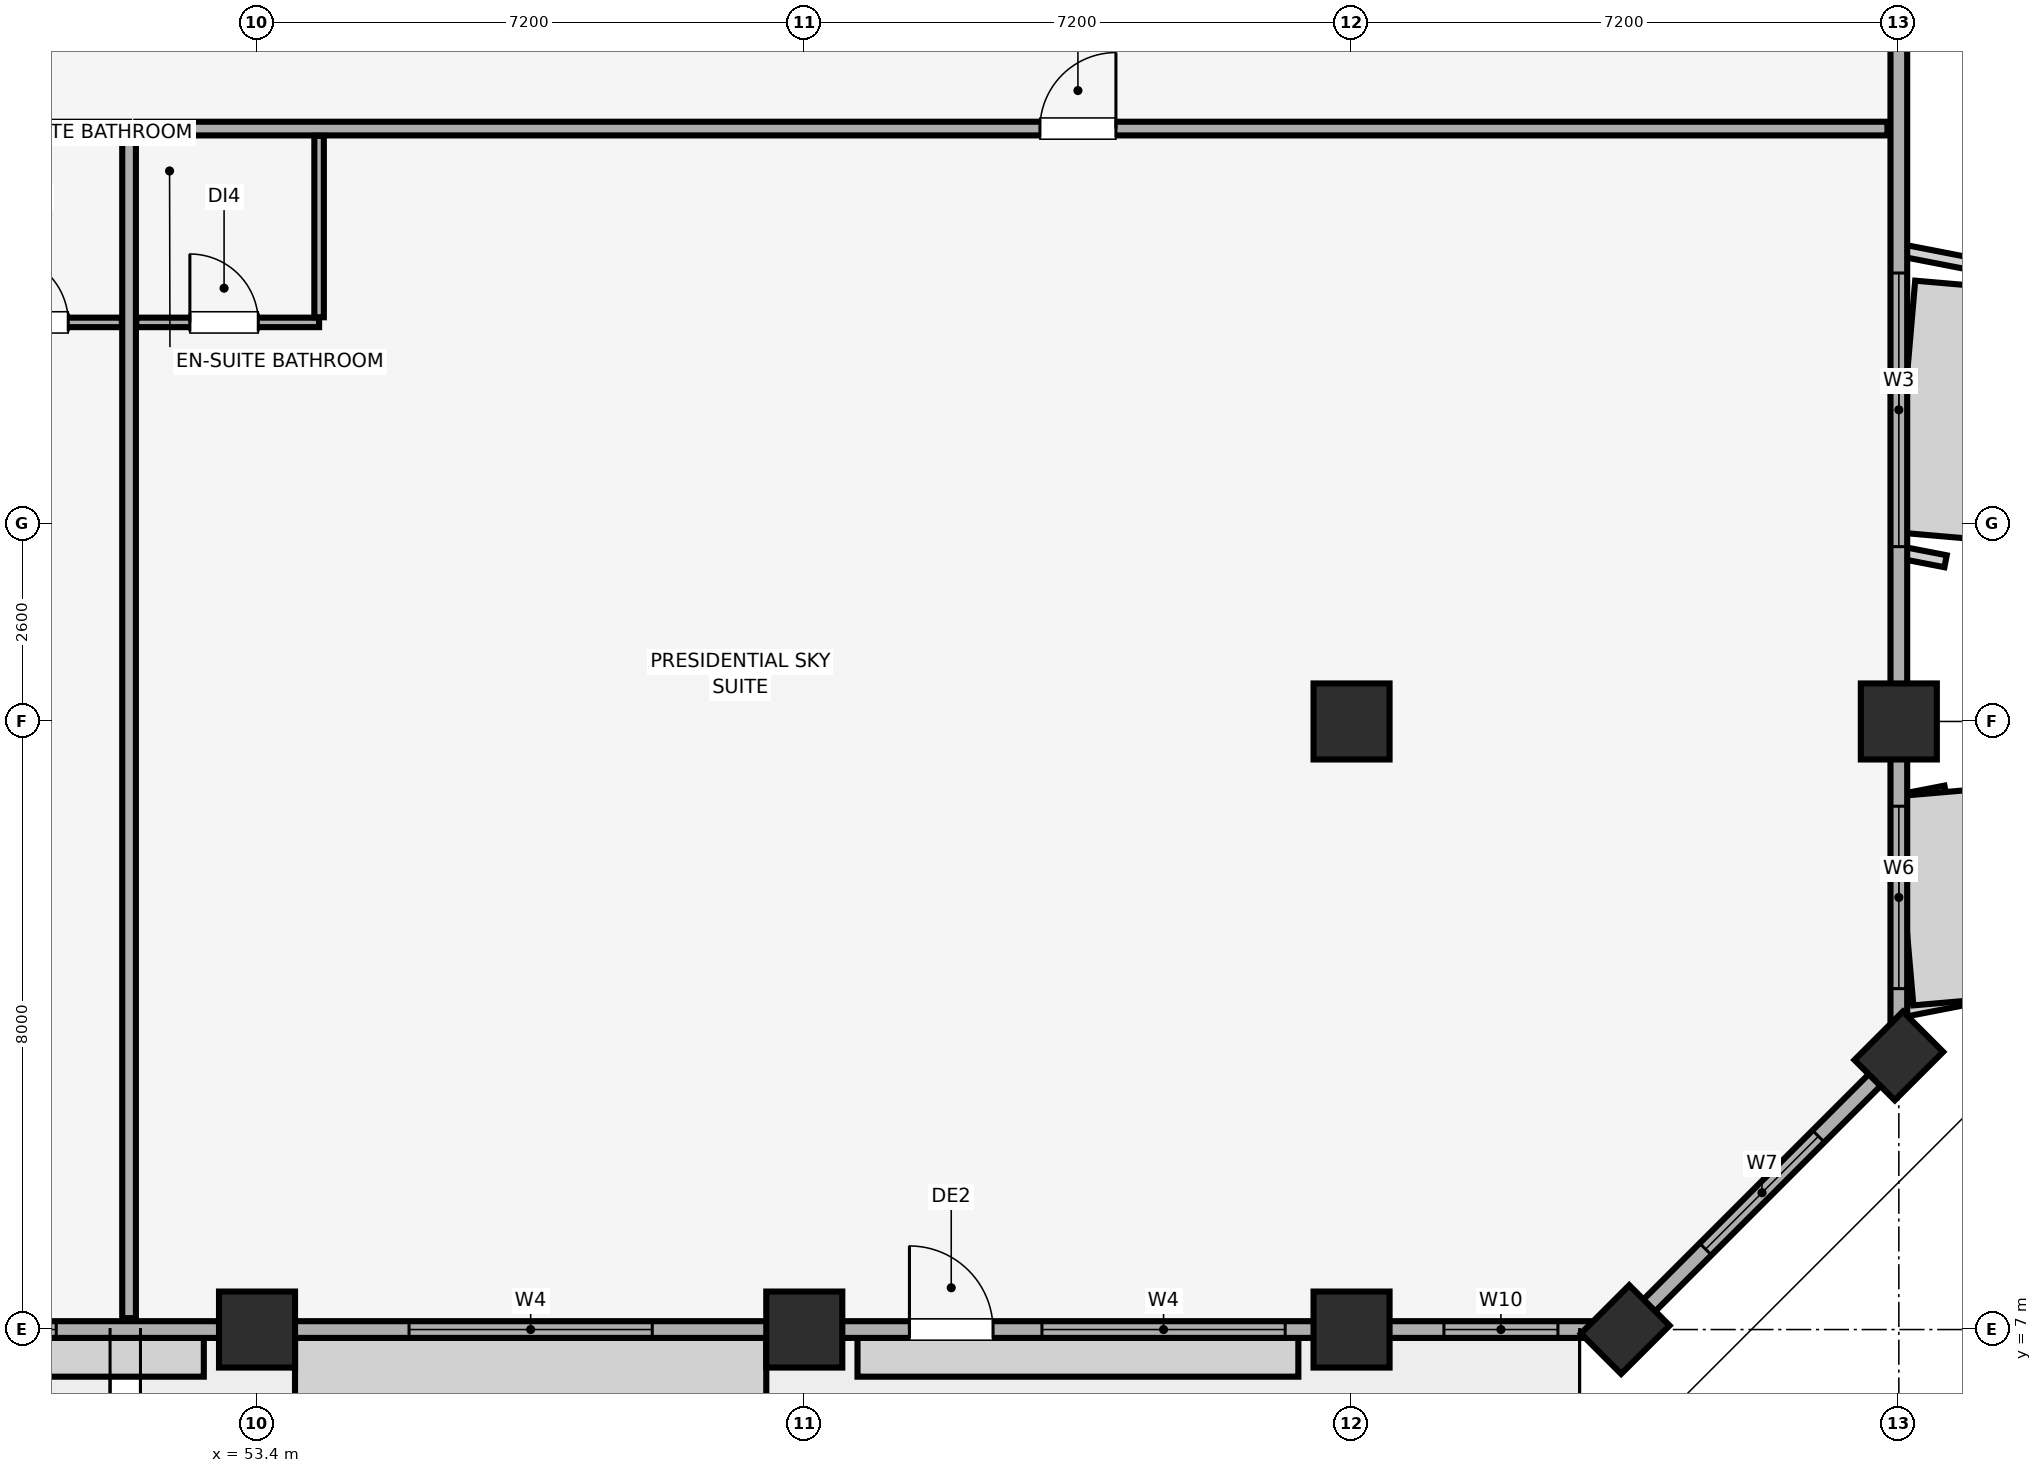
"""IFC4 building model, lengths in metres.
Left out: names, types, materials, properties, quantities, classifications, styles, units other than length and angle.
Written with IfcOpenShell. Run it as: python <this file> out.ifc"""

import sys

from ifc_helpers import new_model, si_unit, direction, frame, frame_2d, origin, origin_2d, place, context, subcontext, project, spatial, rectangle, extrude, element, fill, save


model = new_model("IFC4")
c1 = context("Model", 3, precision=1e-05, world=origin(), true_north=direction((0.0, 1.0)))
c2 = subcontext(c1, "Body", "Model", "MODEL_VIEW")
j1 = project(units=[si_unit("LENGTHUNIT", "METRE"), si_unit("PLANEANGLEUNIT", "RADIAN")], contexts=[c1])
p1 = place(None, origin())
s1 = spatial("IfcSite", under=j1, at=p1, CompositionType="ELEMENT")
p2 = place(p1, origin())
s2 = spatial("IfcBuilding", under=s1, at=p2, CompositionType="ELEMENT")
p3 = place(p2, frame((0.0, 0.0, 290.3)))
s3 = spatial("IfcBuildingStorey", under=s2, at=p3, CompositionType="ELEMENT", Elevation=290.3)
for number, where, z_axis, x_axis in (
    (1, (53.4, 7.0, 0.0), (0.0, 0.0, 1.0), (1.0, 0.0, 0.0)),
    (2, (60.6, 7.0, 0.0), (0.0, 0.0, 1.0), (1.0, 0.0, 0.0)),
    (3, (67.8, 7.0, 0.0), (0.0, 0.0, 1.0), (1.0, 0.0, 0.0)),
    (4, (75.0, 15.0, 0.0), (0.0, 0.0, 1.0), (1.0, 0.0, 0.0)),
):
    element("IfcColumn", number, at=place(p3, frame(where, z_axis=z_axis, x_axis=x_axis)), inside=s3, PredefinedType="COLUMN", context=c2, shape_type="SweptSolid", body=[
        extrude(rectangle(XDim=1.0, YDim=1.0, at=origin_2d()), origin(), (0.0, 0.0, 1.0), 4.02),
    ])
for number, where, z_axis, x_axis in (
    (5, (71.4, 7.0, 0.0), (0.0, 0.0, 1.0), (0.707, 0.707, 0.0)),
    (6, (75.0, 10.6, 0.0), (0.0, 0.0, 1.0), (0.707, 0.707, 0.0)),
):
    element("IfcColumn", number, at=place(p3, frame(where, z_axis=z_axis, x_axis=x_axis)), inside=s3, PredefinedType="PILASTER", context=c2, shape_type="SweptSolid", body=[
        extrude(rectangle(XDim=0.9, YDim=0.75, at=origin_2d()), origin(), (0.0, 0.0, 1.0), 4.02),
    ])
p4 = place(p3, frame((67.8, 15.0, 0.0), z_axis=(0.0, 0.0, 1.0), x_axis=(1.0, 0.0, 0.0)))
e7 = element("IfcColumn", 7, at=p4, inside=s3, PredefinedType="COLUMN", context=c2, shape_type="SweptSolid", body=[
    extrude(rectangle(XDim=1.0, YDim=1.0, at=origin_2d()), origin(), (0.0, 0.0, 1.0), 4.02),
])
p5 = place(p3, frame((12.6, 7.0, 0.0), z_axis=(0.0, 0.0, 1.0), x_axis=(1.0, 0.0, 0.0)))
e8 = element("IfcWall", 8, at=p5, inside=s3, PredefinedType="SOLIDWALL", context=c2, shape_type="SweptSolid", body=[
    extrude(rectangle(XDim=58.8, YDim=0.22, at=frame_2d((29.4, 0.0))), origin(), (0.0, 0.0, 1.0), 3.22),
])
p6 = place(p5, frame((8.317, 0.0, 0.0)))
e9 = element("IfcOpeningElement", 9, at=p6, cuts=e8, PredefinedType="OPENING", context=c2, shape_type="SweptSolid", body=[
    extrude(rectangle(XDim=1.1, YDim=2.15, at=frame_2d((0.55, 1.075))), frame((0.0, 0.12, 0.0), z_axis=(0.0, -1.0, 0.0), x_axis=(1.0, 0.0, 0.0)), (0.0, 0.0, 1.0), 0.24),
])
p7 = place(p5, frame((27.272, 0.0, 0.0)))
e10 = element("IfcOpeningElement", 10, at=p7, cuts=e8, PredefinedType="OPENING", context=c2, shape_type="SweptSolid", body=[
    extrude(rectangle(XDim=1.1, YDim=2.15, at=frame_2d((0.55, 1.075))), frame((0.0, 0.12, 0.0), z_axis=(0.0, -1.0, 0.0), x_axis=(1.0, 0.0, 0.0)), (0.0, 0.0, 1.0), 0.24),
])
p8 = place(p5, frame((49.383, 0.0, 0.0)))
e11 = element("IfcOpeningElement", 11, at=p8, cuts=e8, PredefinedType="OPENING", context=c2, shape_type="SweptSolid", body=[
    extrude(rectangle(XDim=1.1, YDim=2.15, at=frame_2d((0.55, 1.075))), frame((0.0, 0.12, 0.0), z_axis=(0.0, -1.0, 0.0), x_axis=(1.0, 0.0, 0.0)), (0.0, 0.0, 1.0), 0.24),
])
p9 = place(p5, frame((0.885, 0.0, 0.85)))
e12 = element("IfcOpeningElement", 12, at=p9, cuts=e8, PredefinedType="OPENING", context=c2, shape_type="SweptSolid", body=[
    extrude(rectangle(XDim=1.5, YDim=1.4, at=frame_2d((0.75, 0.7))), frame((0.0, 0.12, 0.0), z_axis=(0.0, -1.0, 0.0), x_axis=(1.0, 0.0, 0.0)), (0.0, 0.0, 1.0), 0.24),
])
p10 = place(p5, frame((4.473, 0.0, 0.85)))
e13 = element("IfcOpeningElement", 13, at=p10, cuts=e8, PredefinedType="OPENING", context=c2, shape_type="SweptSolid", body=[
    extrude(rectangle(XDim=3.2, YDim=1.85, at=frame_2d((1.6, 0.925))), frame((0.0, 0.12, 0.0), z_axis=(0.0, -1.0, 0.0), x_axis=(1.0, 0.0, 0.0)), (0.0, 0.0, 1.0), 0.24),
])
p11 = place(p5, frame((12.8, 0.0, 0.85)))
e14 = element("IfcOpeningElement", 14, at=p11, cuts=e8, PredefinedType="OPENING", context=c2, shape_type="SweptSolid", body=[
    extrude(rectangle(XDim=3.2, YDim=1.85, at=frame_2d((1.6, 0.925))), frame((0.0, 0.12, 0.0), z_axis=(0.0, -1.0, 0.0), x_axis=(1.0, 0.0, 0.0)), (0.0, 0.0, 1.0), 0.24),
])
p12 = place(p5, frame((20.642, 0.0, 0.85)))
e15 = element("IfcOpeningElement", 15, at=p12, cuts=e8, PredefinedType="OPENING", context=c2, shape_type="SweptSolid", body=[
    extrude(rectangle(XDim=3.2, YDim=1.85, at=frame_2d((1.6, 0.925))), frame((0.0, 0.12, 0.0), z_axis=(0.0, -1.0, 0.0), x_axis=(1.0, 0.0, 0.0)), (0.0, 0.0, 1.0), 0.24),
])
p13 = place(p5, frame((29.271, 0.0, 0.85)))
e16 = element("IfcOpeningElement", 16, at=p13, cuts=e8, PredefinedType="OPENING", context=c2, shape_type="SweptSolid", body=[
    extrude(rectangle(XDim=3.2, YDim=1.85, at=frame_2d((1.6, 0.925))), frame((0.0, 0.12, 0.0), z_axis=(0.0, -1.0, 0.0), x_axis=(1.0, 0.0, 0.0)), (0.0, 0.0, 1.0), 0.24),
])
p14 = place(p5, frame((34.958, 0.0, 0.85)))
e17 = element("IfcOpeningElement", 17, at=p14, cuts=e8, PredefinedType="OPENING", context=c2, shape_type="SweptSolid", body=[
    extrude(rectangle(XDim=3.2, YDim=1.85, at=frame_2d((1.6, 0.925))), frame((0.0, 0.12, 0.0), z_axis=(0.0, -1.0, 0.0), x_axis=(1.0, 0.0, 0.0)), (0.0, 0.0, 1.0), 0.24),
])
p15 = place(p5, frame((42.8, 0.0, 0.85)))
e18 = element("IfcOpeningElement", 18, at=p15, cuts=e8, PredefinedType="OPENING", context=c2, shape_type="SweptSolid", body=[
    extrude(rectangle(XDim=3.2, YDim=1.85, at=frame_2d((1.6, 0.925))), frame((0.0, 0.12, 0.0), z_axis=(0.0, -1.0, 0.0), x_axis=(1.0, 0.0, 0.0)), (0.0, 0.0, 1.0), 0.24),
])
p16 = place(p5, frame((51.127, 0.0, 0.85)))
e19 = element("IfcOpeningElement", 19, at=p16, cuts=e8, PredefinedType="OPENING", context=c2, shape_type="SweptSolid", body=[
    extrude(rectangle(XDim=3.2, YDim=1.85, at=frame_2d((1.6, 0.925))), frame((0.0, 0.12, 0.0), z_axis=(0.0, -1.0, 0.0), x_axis=(1.0, 0.0, 0.0)), (0.0, 0.0, 1.0), 0.24),
])
p17 = place(p5, frame((56.415, 0.0, 0.85)))
e20 = element("IfcOpeningElement", 20, at=p17, cuts=e8, PredefinedType="OPENING", context=c2, shape_type="SweptSolid", body=[
    extrude(rectangle(XDim=1.5, YDim=1.4, at=frame_2d((0.75, 0.7))), frame((0.0, 0.12, 0.0), z_axis=(0.0, -1.0, 0.0), x_axis=(1.0, 0.0, 0.0)), (0.0, 0.0, 1.0), 0.24),
])
p18 = place(p3, frame((71.4, 7.0, 0.0), z_axis=(0.0, 0.0, 1.0), x_axis=(0.707106781187, 0.707106781187, 0.0)))
e21 = element("IfcWall", 21, at=p18, inside=s3, PredefinedType="SOLIDWALL", context=c2, shape_type="SweptSolid", body=[
    extrude(rectangle(XDim=5.091, YDim=0.22, at=frame_2d((2.546, 0.0))), origin(), (0.0, 0.0, 1.0), 3.22),
])
p19 = place(p18, frame((1.496, 0.0, 0.85)))
e22 = element("IfcOpeningElement", 22, at=p19, cuts=e21, PredefinedType="OPENING", context=c2, shape_type="SweptSolid", body=[
    extrude(rectangle(XDim=2.1, YDim=1.6, at=frame_2d((1.05, 0.8))), frame((0.0, 0.12, 0.0), z_axis=(0.0, -1.0, 0.0), x_axis=(1.0, 0.0, 0.0)), (0.0, 0.0, 1.0), 0.24),
])
p20 = place(p3, frame((75.0, 10.6, 0.0), z_axis=(0.0, 0.0, 1.0), x_axis=(0.0, 1.0, 0.0)))
e23 = element("IfcWall", 23, at=p20, inside=s3, PredefinedType="SOLIDWALL", context=c2, shape_type="SweptSolid", body=[
    extrude(rectangle(XDim=34.8, YDim=0.22, at=frame_2d((17.4, 0.0))), origin(), (0.0, 0.0, 1.0), 3.22),
])
p21 = place(p20, frame((0.885, 0.0, 0.85)))
e24 = element("IfcOpeningElement", 24, at=p21, cuts=e23, PredefinedType="OPENING", context=c2, shape_type="SweptSolid", body=[
    extrude(rectangle(XDim=2.4, YDim=1.5, at=frame_2d((1.2, 0.75))), frame((0.0, 0.12, 0.0), z_axis=(0.0, -1.0, 0.0), x_axis=(1.0, 0.0, 0.0)), (0.0, 0.0, 1.0), 0.24),
])
p22 = place(p20, frame((6.7, 0.0, 0.85)))
e25 = element("IfcOpeningElement", 25, at=p22, cuts=e23, PredefinedType="OPENING", context=c2, shape_type="SweptSolid", body=[
    extrude(rectangle(XDim=3.6, YDim=1.65, at=frame_2d((1.8, 0.825))), frame((0.0, 0.12, 0.0), z_axis=(0.0, -1.0, 0.0), x_axis=(1.0, 0.0, 0.0)), (0.0, 0.0, 1.0), 0.24),
])
p23 = place(p20, frame((15.1, 0.0, 0.85)))
e26 = element("IfcOpeningElement", 26, at=p23, cuts=e23, PredefinedType="OPENING", context=c2, shape_type="SweptSolid", body=[
    extrude(rectangle(XDim=2.4, YDim=1.5, at=frame_2d((1.2, 0.75))), frame((0.0, 0.12, 0.0), z_axis=(0.0, -1.0, 0.0), x_axis=(1.0, 0.0, 0.0)), (0.0, 0.0, 1.0), 0.24),
])
p24 = place(p20, frame((20.015, 0.0, 0.85)))
e27 = element("IfcOpeningElement", 27, at=p24, cuts=e23, PredefinedType="OPENING", context=c2, shape_type="SweptSolid", body=[
    extrude(rectangle(XDim=3.0, YDim=1.5, at=frame_2d((1.5, 0.75))), frame((0.0, 0.12, 0.0), z_axis=(0.0, -1.0, 0.0), x_axis=(1.0, 0.0, 0.0)), (0.0, 0.0, 1.0), 0.24),
])
p25 = place(p20, frame((24.785, 0.0, 0.85)))
e28 = element("IfcOpeningElement", 28, at=p25, cuts=e23, PredefinedType="OPENING", context=c2, shape_type="SweptSolid", body=[
    extrude(rectangle(XDim=3.0, YDim=1.5, at=frame_2d((1.5, 0.75))), frame((0.0, 0.12, 0.0), z_axis=(0.0, -1.0, 0.0), x_axis=(1.0, 0.0, 0.0)), (0.0, 0.0, 1.0), 0.24),
])
p26 = place(p20, frame((30.215, 0.0, 0.85)))
e29 = element("IfcOpeningElement", 29, at=p26, cuts=e23, PredefinedType="OPENING", context=c2, shape_type="SweptSolid", body=[
    extrude(rectangle(XDim=3.6, YDim=1.65, at=frame_2d((1.8, 0.825))), frame((0.0, 0.12, 0.0), z_axis=(0.0, -1.0, 0.0), x_axis=(1.0, 0.0, 0.0)), (0.0, 0.0, 1.0), 0.24),
])
p27 = place(p3, frame((32.378, 22.8, 0.0), z_axis=(0.0, 0.0, 1.0), x_axis=(1.0, 0.0, 0.0)))
e30 = element("IfcWall", 30, at=p27, inside=s3, PredefinedType="PARTITIONING", context=c2, shape_type="SweptSolid", body=[
    extrude(rectangle(XDim=19.338, YDim=0.18, at=frame_2d((9.669, 0.0))), origin(), (0.0, 0.0, 1.0), 4.02),
])
p28 = place(p27, frame((9.122, 0.0, 0.0)))
e31 = element("IfcOpeningElement", 31, at=p28, cuts=e30, PredefinedType="OPENING", context=c2, shape_type="SweptSolid", body=[
    extrude(rectangle(XDim=1.0, YDim=2.15, at=frame_2d((0.5, 1.075))), frame((0.0, 0.1, 0.0), z_axis=(0.0, -1.0, 0.0), x_axis=(1.0, 0.0, 0.0)), (0.0, 0.0, 1.0), 0.2),
])
p29 = place(p3, frame((51.717, 7.15, 0.0), z_axis=(0.0, 0.0, 1.0), x_axis=(0.0, 1.0, 0.0)))
e32 = element("IfcWall", 32, at=p29, inside=s3, PredefinedType="PARTITIONING", context=c2, shape_type="SweptSolid", body=[
    extrude(rectangle(XDim=15.555, YDim=0.18, at=frame_2d((7.778, 0.0))), origin(), (0.0, 0.0, 1.0), 4.02),
])
p30 = place(p3, frame((49.217, 20.25, 0.0), z_axis=(0.0, 0.0, 1.0), x_axis=(1.0, 0.0, 0.0)))
e33 = element("IfcWall", 33, at=p30, inside=s3, PredefinedType="PARTITIONING", context=c2, shape_type="SweptSolid", body=[
    extrude(rectangle(XDim=2.405, YDim=0.125, at=frame_2d((1.202, 0.0))), origin(), (0.0, 0.0, 1.0), 4.02),
])
p31 = place(p30, frame((0.8, 0.0, 0.0)))
e34 = element("IfcOpeningElement", 34, at=p31, cuts=e33, PredefinedType="OPENING", context=c2, shape_type="SweptSolid", body=[
    extrude(rectangle(XDim=0.9, YDim=2.1, at=frame_2d((0.45, 1.05))), frame((0.0, 0.073, 0.0), z_axis=(0.0, -1.0, 0.0), x_axis=(1.0, 0.0, 0.0)), (0.0, 0.0, 1.0), 0.145),
])
p32 = place(p3, frame((51.812, 22.8, 0.0), z_axis=(0.0, 0.0, 1.0), x_axis=(1.0, 0.0, 0.0)))
e35 = element("IfcWall", 35, at=p32, inside=s3, PredefinedType="PARTITIONING", context=c2, shape_type="SweptSolid", body=[
    extrude(rectangle(XDim=23.038, YDim=0.18, at=frame_2d((11.519, 0.0))), origin(), (0.0, 0.0, 1.0), 4.02),
])
p33 = place(p32, frame((11.888, 0.0, 0.0)))
e36 = element("IfcOpeningElement", 36, at=p33, cuts=e35, PredefinedType="OPENING", context=c2, shape_type="SweptSolid", body=[
    extrude(rectangle(XDim=1.0, YDim=2.15, at=frame_2d((0.5, 1.075))), frame((0.0, 0.1, 0.0), z_axis=(0.0, -1.0, 0.0), x_axis=(1.0, 0.0, 0.0)), (0.0, 0.0, 1.0), 0.2),
])
p34 = place(p3, frame((51.812, 20.25, 0.0), z_axis=(0.0, 0.0, 1.0), x_axis=(1.0, 0.0, 0.0)))
e37 = element("IfcWall", 37, at=p34, inside=s3, PredefinedType="PARTITIONING", context=c2, shape_type="SweptSolid", body=[
    extrude(rectangle(XDim=2.405, YDim=0.125, at=frame_2d((1.203, 0.0))), origin(), (0.0, 0.0, 1.0), 4.02),
])
p35 = place(p34, frame((0.705, 0.0, 0.0)))
e38 = element("IfcOpeningElement", 38, at=p35, cuts=e37, PredefinedType="OPENING", context=c2, shape_type="SweptSolid", body=[
    extrude(rectangle(XDim=0.9, YDim=2.1, at=frame_2d((0.45, 1.05))), frame((0.0, 0.073, 0.0), z_axis=(0.0, -1.0, 0.0), x_axis=(1.0, 0.0, 0.0)), (0.0, 0.0, 1.0), 0.145),
])
p36 = place(p3, frame((54.217, 20.317, 0.0), z_axis=(0.0, 0.0, 1.0), x_axis=(0.0, 1.0, 0.0)))
e39 = element("IfcWall", 39, at=p36, inside=s3, PredefinedType="PARTITIONING", context=c2, shape_type="SweptSolid", body=[
    extrude(rectangle(XDim=2.388, YDim=0.125, at=frame_2d((1.194, 0.0))), origin(), (0.0, 0.0, 1.0), 4.02),
])
p37 = place(p19, origin())
e40 = element("IfcWindow", 40, at=p37, inside=s3, PartitioningType="SINGLE_PANEL", PredefinedType="WINDOW", context=c2, shape_type="SweptSolid", body=[
    extrude(rectangle(XDim=2.1, YDim=1.6, at=frame_2d((1.05, 0.8))), frame((0.0, 0.03, 0.0), z_axis=(0.0, -1.0, 0.0), x_axis=(1.0, 0.0, 0.0)), (0.0, 0.0, 1.0), 0.06),
])
fill(e22, e40)
p38 = place(p8, origin())
e41 = element("IfcDoor", 41, at=p38, inside=s3, OperationType="SINGLE_SWING_LEFT", PredefinedType="DOOR", context=c2, shape_type="SweptSolid", body=[
    extrude(rectangle(XDim=1.1, YDim=2.15, at=frame_2d((0.55, 1.075))), frame((0.0, 0.025, 0.0), z_axis=(0.0, -1.0, 0.0), x_axis=(1.0, 0.0, 0.0)), (0.0, 0.0, 1.0), 0.05),
])
fill(e11, e41)
p39 = place(p14, origin())
e42 = element("IfcWindow", 42, at=p39, inside=s3, PartitioningType="SINGLE_PANEL", PredefinedType="WINDOW", context=c2, shape_type="SweptSolid", body=[
    extrude(rectangle(XDim=3.2, YDim=1.85, at=frame_2d((1.6, 0.925))), frame((0.0, 0.03, 0.0), z_axis=(0.0, -1.0, 0.0), x_axis=(1.0, 0.0, 0.0)), (0.0, 0.0, 1.0), 0.06),
])
fill(e17, e42)
p40 = place(p15, origin())
e43 = element("IfcWindow", 43, at=p40, inside=s3, PartitioningType="SINGLE_PANEL", PredefinedType="WINDOW", context=c2, shape_type="SweptSolid", body=[
    extrude(rectangle(XDim=3.2, YDim=1.85, at=frame_2d((1.6, 0.925))), frame((0.0, 0.03, 0.0), z_axis=(0.0, -1.0, 0.0), x_axis=(1.0, 0.0, 0.0)), (0.0, 0.0, 1.0), 0.06),
])
fill(e18, e43)
p41 = place(p16, origin())
e44 = element("IfcWindow", 44, at=p41, inside=s3, PartitioningType="SINGLE_PANEL", PredefinedType="WINDOW", context=c2, shape_type="SweptSolid", body=[
    extrude(rectangle(XDim=3.2, YDim=1.85, at=frame_2d((1.6, 0.925))), frame((0.0, 0.03, 0.0), z_axis=(0.0, -1.0, 0.0), x_axis=(1.0, 0.0, 0.0)), (0.0, 0.0, 1.0), 0.06),
])
fill(e19, e44)
p42 = place(p17, origin())
e45 = element("IfcWindow", 45, at=p42, inside=s3, PartitioningType="SINGLE_PANEL", PredefinedType="WINDOW", context=c2, shape_type="SweptSolid", body=[
    extrude(rectangle(XDim=1.5, YDim=1.4, at=frame_2d((0.75, 0.7))), frame((0.0, 0.03, 0.0), z_axis=(0.0, -1.0, 0.0), x_axis=(1.0, 0.0, 0.0)), (0.0, 0.0, 1.0), 0.06),
])
fill(e20, e45)
p43 = place(p21, origin())
e46 = element("IfcWindow", 46, at=p43, inside=s3, PartitioningType="SINGLE_PANEL", PredefinedType="WINDOW", context=c2, shape_type="SweptSolid", body=[
    extrude(rectangle(XDim=2.4, YDim=1.5, at=frame_2d((1.2, 0.75))), frame((0.0, 0.03, 0.0), z_axis=(0.0, -1.0, 0.0), x_axis=(1.0, 0.0, 0.0)), (0.0, 0.0, 1.0), 0.06),
])
fill(e24, e46)
p44 = place(p22, origin())
e47 = element("IfcWindow", 47, at=p44, inside=s3, PartitioningType="SINGLE_PANEL", PredefinedType="WINDOW", context=c2, shape_type="SweptSolid", body=[
    extrude(rectangle(XDim=3.6, YDim=1.65, at=frame_2d((1.8, 0.825))), frame((0.0, 0.03, 0.0), z_axis=(0.0, -1.0, 0.0), x_axis=(1.0, 0.0, 0.0)), (0.0, 0.0, 1.0), 0.06),
])
fill(e25, e47)
p45 = place(p31, origin())
e48 = element("IfcDoor", 48, at=p45, inside=s3, OperationType="SINGLE_SWING_LEFT", PredefinedType="DOOR", context=c2, shape_type="SweptSolid", body=[
    extrude(rectangle(XDim=0.9, YDim=2.1, at=frame_2d((0.45, 1.05))), frame((0.0, 0.025, 0.0), z_axis=(0.0, -1.0, 0.0), x_axis=(1.0, 0.0, 0.0)), (0.0, 0.0, 1.0), 0.05),
])
fill(e34, e48)
p46 = place(p33, origin())
e49 = element("IfcDoor", 49, at=p46, inside=s3, OperationType="SINGLE_SWING_RIGHT", PredefinedType="DOOR", context=c2, shape_type="SweptSolid", body=[
    extrude(rectangle(XDim=1.0, YDim=2.15, at=frame_2d((0.5, 1.075))), frame((0.0, 0.025, 0.0), z_axis=(0.0, -1.0, 0.0), x_axis=(1.0, 0.0, 0.0)), (0.0, 0.0, 1.0), 0.05),
])
fill(e36, e49)
p47 = place(p35, origin())
e50 = element("IfcDoor", 50, at=p47, inside=s3, OperationType="SINGLE_SWING_LEFT", PredefinedType="DOOR", context=c2, shape_type="SweptSolid", body=[
    extrude(rectangle(XDim=0.9, YDim=2.1, at=frame_2d((0.45, 1.05))), frame((0.0, 0.025, 0.0), z_axis=(0.0, -1.0, 0.0), x_axis=(1.0, 0.0, 0.0)), (0.0, 0.0, 1.0), 0.05),
])
fill(e38, e50)
save(model, sys.argv[1])
